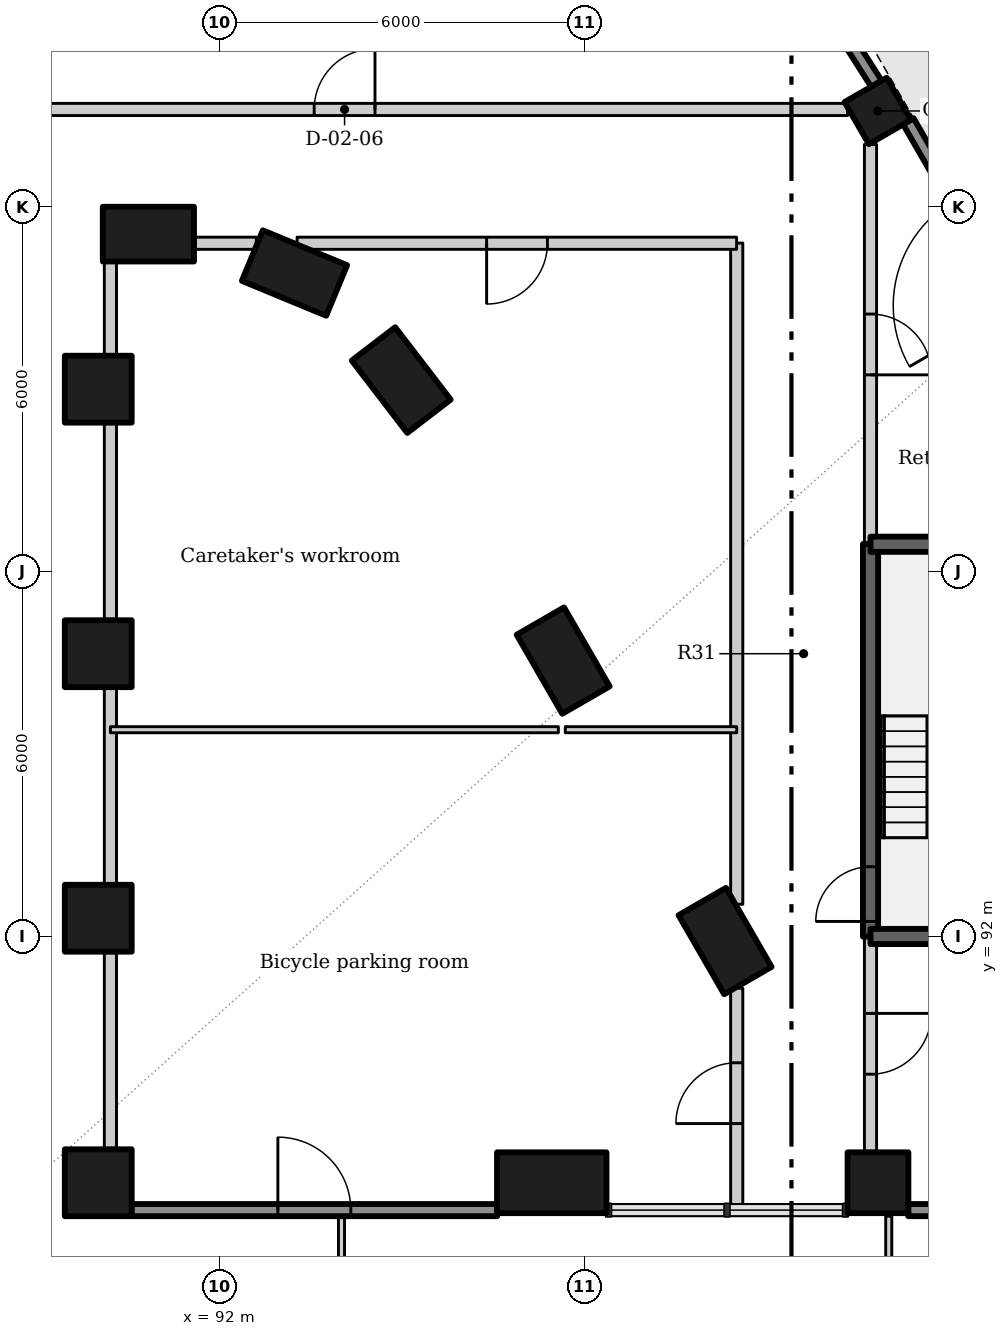
"""IFC4 building model, lengths in metres.
Left out: names, types, materials, properties, quantities, classifications, styles, units other than length and angle.
Written with IfcOpenShell. Run it as: python <this file> out.ifc"""

import sys

from ifc_helpers import new_model, si_unit, direction, frame, frame_2d, origin, origin_2d, place, context, subcontext, project, spatial, rectangle, extrude, element, fill, save


model = new_model("IFC4")
c1 = context("Model", 3, precision=1e-05, world=origin(), true_north=direction((0.0, 1.0)))
c2 = subcontext(c1, "Body", "Model", "MODEL_VIEW")
j1 = project(units=[si_unit("LENGTHUNIT", "METRE"), si_unit("PLANEANGLEUNIT", "RADIAN")], contexts=[c1])
p1 = place(None, origin())
s1 = spatial("IfcSite", under=j1, at=p1, CompositionType="ELEMENT")
p2 = place(p1, origin())
s2 = spatial("IfcBuilding", under=s1, at=p2, CompositionType="ELEMENT")
p3 = place(p2, origin())
s3 = spatial("IfcBuildingStorey", under=s2, at=p3, CompositionType="ELEMENT", Elevation=0.0)
for number, where, z_axis, x_axis in (
    (1, (100.308, 91.925, -1.8), (0.0, 0.0, 1.0), (-0.5, 0.866, 0.0)),
    (2, (97.646, 96.537, -1.8), (0.0, 0.0, 1.0), (-0.5, 0.866, 0.0)),
    (3, (94.982, 101.149, -1.8), (0.0, 0.0, 1.0), (-0.609, 0.793, 0.0)),
    (4, (93.227, 102.91, -1.8), (0.0, 0.0, 1.0), (-0.924, 0.383, 0.0)),
    (5, (90.825, 103.55, -1.8), (0.0, 0.0, 1.0), (-1.0, 0.0, 0.0)),
):
    element("IfcColumn", number, at=place(p3, frame(where, z_axis=z_axis, x_axis=x_axis)), inside=s3, PredefinedType="COLUMN", context=c2, shape_type="SweptSolid", body=[
        extrude(rectangle(XDim=1.5, YDim=0.9, at=origin_2d()), origin(), (0.0, 0.0, 1.0), 8.4),
    ])
for number, where, z_axis, x_axis in (
    (6, (90.0, 87.95, -1.8), (0.0, 0.0, 1.0), (0.0, 1.0, 0.0)),
    (7, (90.0, 92.3, -1.8), (0.0, 0.0, 1.0), (0.0, 1.0, 0.0)),
    (8, (90.0, 96.65, -1.8), (0.0, 0.0, 1.0), (0.0, 1.0, 0.0)),
    (9, (90.0, 101.0, -1.8), (0.0, 0.0, 1.0), (0.0, 1.0, 0.0)),
):
    element("IfcColumn", number, at=place(p3, frame(where, z_axis=z_axis, x_axis=x_axis)), inside=s3, PredefinedType="COLUMN", context=c2, shape_type="SweptSolid", body=[
        extrude(rectangle(XDim=1.1, YDim=1.1, at=origin_2d()), origin(), (0.0, 0.0, 1.0), 8.4),
    ])
p4 = place(p3, frame((102.82, 105.575, -1.8), z_axis=(0.0, 0.0, 1.0), x_axis=(-0.5, 0.866025403784, 0.0)))
e10 = element("IfcColumn", 10, at=p4, inside=s3, PredefinedType="COLUMN", context=c2, shape_type="SweptSolid", body=[
    extrude(rectangle(XDim=0.8, YDim=0.8, at=origin_2d()), origin(), (0.0, 0.0, 1.0), 8.4),
])
p5 = place(p3, frame((97.458, 87.95, -1.8), z_axis=(0.0, 0.0, 1.0), x_axis=(1.0, 0.0, 0.0)))
e11 = element("IfcColumn", 11, at=p5, inside=s3, PredefinedType="COLUMN", context=c2, shape_type="SweptSolid", body=[
    extrude(rectangle(XDim=1.8, YDim=1.0, at=origin_2d()), origin(), (0.0, 0.0, 1.0), 8.4),
])
p6 = place(p3, frame((102.823, 87.95, -1.8), z_axis=(0.0, 0.0, 1.0), x_axis=(1.0, 0.0, 0.0)))
e12 = element("IfcColumn", 12, at=p6, inside=s3, PredefinedType="COLUMN", context=c2, shape_type="SweptSolid", body=[
    extrude(rectangle(XDim=1.0, YDim=1.0, at=origin_2d()), origin(), (0.0, 0.0, 1.0), 8.4),
])
p7 = place(p3, frame((90.546, 87.5, 0.0), z_axis=(0.0, 0.0, 1.0), x_axis=(1.0, 0.0, 0.0)))
e13 = element("IfcWall", 13, at=p7, inside=s3, PredefinedType="SOLIDWALL", context=c2, shape_type="SweptSolid", body=[
    extrude(rectangle(XDim=6.016, YDim=0.2, at=frame_2d((3.008, 0.0))), origin(), (0.0, 0.0, 1.0), 5.4),
])
p8 = place(p7, frame((2.408, 0.0, 0.0)))
e14 = element("IfcOpeningElement", 14, at=p8, cuts=e13, PredefinedType="OPENING", context=c2, shape_type="SweptSolid", body=[
    extrude(rectangle(XDim=1.2, YDim=2.4, at=frame_2d((0.6, 1.2))), frame((0.0, 0.11, 0.0), z_axis=(0.0, -1.0, 0.0), x_axis=(1.0, 0.0, 0.0)), (0.0, 0.0, 1.0), 0.22),
])
p9 = place(p3, frame((103.319, 87.5, 0.0), z_axis=(0.0, 0.0, 1.0), x_axis=(1.0, 0.0, 0.0)))
e15 = element("IfcWall", 15, at=p9, inside=s3, PredefinedType="SOLIDWALL", context=c2, shape_type="SweptSolid", body=[
    extrude(rectangle(XDim=4.094, YDim=0.2, at=frame_2d((2.047, 0.0))), origin(), (0.0, 0.0, 1.0), 5.4),
])
p10 = place(p9, frame((0.847, 0.0, 0.0)))
e16 = element("IfcOpeningElement", 16, at=p10, cuts=e15, PredefinedType="OPENING", context=c2, shape_type="SweptSolid", body=[
    extrude(rectangle(XDim=2.4, YDim=2.7, at=frame_2d((1.2, 1.35))), frame((0.0, 0.11, 0.0), z_axis=(0.0, -1.0, 0.0), x_axis=(1.0, 0.0, 0.0)), (0.0, 0.0, 1.0), 0.22),
])
p11 = place(p3, frame((105.826, 101.068, 0.0), z_axis=(0.0, 0.0, 1.0), x_axis=(-0.499990997566, 0.86603060128, 0.0)))
e17 = element("IfcWall", 17, at=p11, inside=s3, PredefinedType="SOLIDWALL", context=c2, shape_type="SweptSolid", body=[
    extrude(rectangle(XDim=5.01, YDim=0.2, at=frame_2d((2.505, 0.0))), origin(), (0.0, 0.0, 1.0), 5.4),
])
p12 = place(p11, frame((1.505, 0.0, 0.0)))
e18 = element("IfcOpeningElement", 18, at=p12, cuts=e17, PredefinedType="OPENING", context=c2, shape_type="SweptSolid", body=[
    extrude(rectangle(XDim=2.0, YDim=2.4, at=frame_2d((1.0, 1.2))), frame((0.0, 0.11, 0.0), z_axis=(0.0, -1.0, 0.0), x_axis=(1.0, 0.0, 0.0)), (0.0, 0.0, 1.0), 0.22),
])
p13 = place(p3, frame((102.798, 106.022, 0.0), z_axis=(0.0, 0.0, 1.0), x_axis=(-0.537671911107, 0.843154147239, 0.0)))
e19 = element("IfcWall", 19, at=p13, inside=s3, PredefinedType="SOLIDWALL", context=c2, shape_type="SweptSolid", body=[
    extrude(rectangle(XDim=5.057, YDim=0.2, at=frame_2d((2.528, 0.0))), origin(), (0.0, 0.0, 1.0), 5.4),
])
p14 = place(p13, frame((1.928, 0.0, 0.0)))
e20 = element("IfcOpeningElement", 20, at=p14, cuts=e19, PredefinedType="OPENING", context=c2, shape_type="SweptSolid", body=[
    extrude(rectangle(XDim=1.2, YDim=2.4, at=frame_2d((0.6, 1.2))), frame((0.0, 0.11, 0.0), z_axis=(0.0, -1.0, 0.0), x_axis=(1.0, 0.0, 0.0)), (0.0, 0.0, 1.0), 0.22),
])
p15 = place(p3, frame((102.7, 91.997, -1.8), z_axis=(0.0, 0.0, 1.0), x_axis=(0.0, 1.0, 0.0)))
e21 = element("IfcWall", 21, at=p15, inside=s3, PredefinedType="SHEAR", context=c2, shape_type="SweptSolid", body=[
    extrude(rectangle(XDim=6.456, YDim=0.25, at=frame_2d((3.228, 0.0))), origin(), (0.0, 0.0, 1.0), 8.1),
])
p16 = place(p15, frame((0.25, 0.0, 1.8)))
e22 = element("IfcOpeningElement", 22, at=p16, cuts=e21, PredefinedType="OPENING", context=c2, shape_type="SweptSolid", body=[
    extrude(rectangle(XDim=0.9, YDim=2.1, at=frame_2d((0.45, 1.05))), frame((0.0, 0.135, 0.0), z_axis=(0.0, -1.0, 0.0), x_axis=(1.0, 0.0, 0.0)), (0.0, 0.0, 1.0), 0.27),
])
p17 = place(p3, frame((102.7, 92.003, 0.0), z_axis=(0.0, 0.0, 1.0), x_axis=(0.0, -1.0, 0.0)))
e23 = element("IfcWall", 23, at=p17, inside=s3, PredefinedType="PARTITIONING", context=c2, shape_type="SweptSolid", body=[
    extrude(rectangle(XDim=3.536, YDim=0.2, at=frame_2d((1.768, 0.0))), origin(), (0.0, 0.0, 1.0), 6.3),
])
p18 = place(p17, frame((1.268, 0.0, 0.0)))
e24 = element("IfcOpeningElement", 24, at=p18, cuts=e23, PredefinedType="OPENING", context=c2, shape_type="SweptSolid", body=[
    extrude(rectangle(XDim=1.0, YDim=2.1, at=frame_2d((0.5, 1.05))), frame((0.0, 0.11, 0.0), z_axis=(0.0, -1.0, 0.0), x_axis=(1.0, 0.0, 0.0)), (0.0, 0.0, 1.0), 0.22),
])
p19 = place(p3, frame((102.7, 105.025, 0.0), z_axis=(0.0, 0.0, 1.0), x_axis=(0.0, -1.0, 0.0)))
e25 = element("IfcWall", 25, at=p19, inside=s3, PredefinedType="PARTITIONING", context=c2, shape_type="SweptSolid", body=[
    extrude(rectangle(XDim=6.578, YDim=0.2, at=frame_2d((3.289, 0.0))), origin(), (0.0, 0.0, 1.0), 6.3),
])
p20 = place(p19, frame((2.789, 0.0, 0.0)))
e26 = element("IfcOpeningElement", 26, at=p20, cuts=e25, PredefinedType="OPENING", context=c2, shape_type="SweptSolid", body=[
    extrude(rectangle(XDim=1.0, YDim=2.1, at=frame_2d((0.5, 1.05))), frame((0.0, 0.11, 0.0), z_axis=(0.0, -1.0, 0.0), x_axis=(1.0, 0.0, 0.0)), (0.0, 0.0, 1.0), 0.22),
])
p21 = place(p3, frame((81.6, 105.6, 0.0), z_axis=(0.0, 0.0, 1.0), x_axis=(1.0, 0.0, 0.0)))
e27 = element("IfcWall", 27, at=p21, inside=s3, PredefinedType="PARTITIONING", context=c2, shape_type="SweptSolid", body=[
    extrude(rectangle(XDim=20.723, YDim=0.2, at=frame_2d((10.362, 0.0))), origin(), (0.0, 0.0, 1.0), 6.3),
])
p22 = place(p21, frame((11.951, 0.0, 0.0)))
e28 = element("IfcOpeningElement", 28, at=p22, cuts=e27, PredefinedType="OPENING", context=c2, shape_type="SweptSolid", body=[
    extrude(rectangle(XDim=1.0, YDim=2.1, at=frame_2d((0.5, 1.05))), frame((0.0, 0.11, 0.0), z_axis=(0.0, -1.0, 0.0), x_axis=(1.0, 0.0, 0.0)), (0.0, 0.0, 1.0), 0.22),
])
p23 = place(p3, frame((100.5, 87.58, 0.0), z_axis=(0.0, 0.0, 1.0), x_axis=(0.0, 1.0, 0.0)))
e29 = element("IfcWall", 29, at=p23, inside=s3, PredefinedType="PARTITIONING", context=c2, shape_type="SweptSolid", body=[
    extrude(rectangle(XDim=3.569, YDim=0.2, at=frame_2d((1.785, 0.0))), origin(), (0.0, 0.0, 1.0), 5.53),
])
p24 = place(p23, frame((1.343, 0.0, 0.0)))
e30 = element("IfcOpeningElement", 30, at=p24, cuts=e29, PredefinedType="OPENING", context=c2, shape_type="SweptSolid", body=[
    extrude(rectangle(XDim=1.0, YDim=2.1, at=frame_2d((0.5, 1.05))), frame((0.0, 0.11, 0.0), z_axis=(0.0, -1.0, 0.0), x_axis=(1.0, 0.0, 0.0)), (0.0, 0.0, 1.0), 0.22),
])
p25 = place(p3, frame((100.5, 92.53, 0.0), z_axis=(0.0, 0.0, 1.0), x_axis=(0.0, 1.0, 0.0)))
e31 = element("IfcWall", 31, at=p25, inside=s3, PredefinedType="PARTITIONING", context=c2, shape_type="SweptSolid", body=[
    extrude(rectangle(XDim=10.873, YDim=0.2, at=frame_2d((5.437, 0.0))), origin(), (0.0, 0.0, 1.0), 6.3),
])
p26 = place(p3, frame((90.2, 88.517, 0.0), z_axis=(0.0, 0.0, 1.0), x_axis=(0.0, 1.0, 0.0)))
e32 = element("IfcWall", 32, at=p26, inside=s3, PredefinedType="PARTITIONING", context=c2, shape_type="SweptSolid", body=[
    extrude(rectangle(XDim=3.216, YDim=0.2, at=frame_2d((1.608, 0.0))), origin(), (0.0, 0.0, 1.0), 5.53),
])
for number, where, z_axis, x_axis in (
    (33, (90.2, 92.867, 0.0), (0.0, 0.0, 1.0), (0.0, 1.0, 0.0)),
    (34, (90.2, 97.217, 0.0), (0.0, 0.0, 1.0), (0.0, 1.0, 0.0)),
):
    element("IfcWall", number, at=place(p3, frame(where, z_axis=z_axis, x_axis=x_axis)), inside=s3, PredefinedType="PARTITIONING", context=c2, shape_type="SweptSolid", body=[
        extrude(rectangle(XDim=3.216, YDim=0.2, at=frame_2d((1.608, 0.0))), origin(), (0.0, 0.0, 1.0), 5.53),
    ])
p27 = place(p3, frame((90.2, 101.567, 0.0), z_axis=(0.0, 0.0, 1.0), x_axis=(0.0, 1.0, 0.0)))
e35 = element("IfcWall", 35, at=p27, inside=s3, PredefinedType="PARTITIONING", context=c2, shape_type="SweptSolid", body=[
    extrude(rectangle(XDim=1.516, YDim=0.2, at=frame_2d((0.758, 0.0))), origin(), (0.0, 0.0, 1.0), 6.3),
])
p28 = place(p3, frame((91.592, 103.4, 0.0), z_axis=(0.0, 0.0, 1.0), x_axis=(1.0, 0.0, 0.0)))
e36 = element("IfcWall", 36, at=p28, inside=s3, PredefinedType="PARTITIONING", context=c2, shape_type="SweptSolid", body=[
    extrude(rectangle(XDim=1.008, YDim=0.2, at=frame_2d((0.504, 0.0))), origin(), (0.0, 0.0, 1.0), 5.38),
])
p29 = place(p3, frame((100.498, 103.4, 0.0), z_axis=(0.0, 0.0, 1.0), x_axis=(-1.0, 0.0, 0.0)))
e37 = element("IfcWall", 37, at=p29, inside=s3, PredefinedType="PARTITIONING", context=c2, shape_type="SweptSolid", body=[
    extrude(rectangle(XDim=7.228, YDim=0.2, at=frame_2d((3.614, 0.0))), origin(), (0.0, 0.0, 1.0), 6.3),
])
p30 = place(p29, frame((3.111, 0.0, 0.0)))
e38 = element("IfcOpeningElement", 38, at=p30, cuts=e37, PredefinedType="OPENING", context=c2, shape_type="SweptSolid", body=[
    extrude(rectangle(XDim=1.0, YDim=2.1, at=frame_2d((0.5, 1.05))), frame((0.0, 0.11, 0.0), z_axis=(0.0, -1.0, 0.0), x_axis=(1.0, 0.0, 0.0)), (0.0, 0.0, 1.0), 0.22),
])
for number, where, z_axis, x_axis in (
    (39, (102.7, 92.0, -1.8), (0.0, 0.0, 1.0), (1.0, 0.0, 0.0)),
    (40, (102.7, 98.45, -1.8), (0.0, 0.0, 1.0), (1.0, 0.0, 0.0)),
):
    element("IfcWall", number, at=place(p3, frame(where, z_axis=z_axis, x_axis=x_axis)), inside=s3, PredefinedType="SHEAR", context=c2, shape_type="SweptSolid", body=[
        extrude(rectangle(XDim=3.45, YDim=0.25, at=frame_2d((1.725, 0.0))), origin(), (0.0, 0.0, 1.0), 8.1),
    ])
p31 = place(p3, frame((90.2, 95.4, 0.0), z_axis=(0.0, 0.0, 1.0), x_axis=(1.0, 0.0, 0.0)))
e41 = element("IfcWall", 41, at=p31, inside=s3, PredefinedType="PARTITIONING", context=c2, shape_type="SweptSolid", body=[
    extrude(rectangle(XDim=7.366, YDim=0.1, at=frame_2d((3.683, 0.0))), origin(), (0.0, 0.0, 1.0), 6.3),
])
p32 = place(p3, frame((97.68, 95.4, 0.0), z_axis=(0.0, 0.0, 1.0), x_axis=(1.0, 0.0, 0.0)))
e42 = element("IfcWall", 42, at=p32, inside=s3, PredefinedType="PARTITIONING", context=c2, shape_type="SweptSolid", body=[
    extrude(rectangle(XDim=2.82, YDim=0.1, at=frame_2d((1.41, 0.0))), origin(), (0.0, 0.0, 1.0), 5.38),
])
p33 = place(p3, frame((94.0, 87.4, 0.0), z_axis=(0.0, 0.0, 1.0), x_axis=(0.0, -1.0, 0.0)))
e43 = element("IfcWall", 43, at=p33, inside=s3, PredefinedType="PARTITIONING", context=c2, shape_type="SweptSolid", body=[
    extrude(rectangle(XDim=14.8, YDim=0.1, at=frame_2d((7.4, 0.0))), origin(), (0.0, 0.0, 1.0), 6.3),
])
p34 = place(p33, frame((6.65, 0.0, 0.0)))
e44 = element("IfcOpeningElement", 44, at=p34, cuts=e43, PredefinedType="OPENING", context=c2, shape_type="SweptSolid", body=[
    extrude(rectangle(XDim=1.5, YDim=2.1, at=frame_2d((0.75, 1.05))), frame((0.0, 0.06, 0.0), z_axis=(0.0, -1.0, 0.0), x_axis=(1.0, 0.0, 0.0)), (0.0, 0.0, 1.0), 0.12),
])
p35 = place(p3, frame((103.0, 87.4, 0.0), z_axis=(0.0, 0.0, 1.0), x_axis=(0.0, -1.0, 0.0)))
e45 = element("IfcWall", 45, at=p35, inside=s3, PredefinedType="PARTITIONING", context=c2, shape_type="SweptSolid", body=[
    extrude(rectangle(XDim=14.8, YDim=0.1, at=frame_2d((7.4, 0.0))), origin(), (0.0, 0.0, 1.0), 6.3),
])
p36 = place(p35, frame((6.65, 0.0, 0.0)))
e46 = element("IfcOpeningElement", 46, at=p36, cuts=e45, PredefinedType="OPENING", context=c2, shape_type="SweptSolid", body=[
    extrude(rectangle(XDim=1.5, YDim=2.1, at=frame_2d((0.75, 1.05))), frame((0.0, 0.06, 0.0), z_axis=(0.0, -1.0, 0.0), x_axis=(1.0, 0.0, 0.0)), (0.0, 0.0, 1.0), 0.12),
])
p37 = place(p8, origin())
e47 = element("IfcDoor", 47, at=p37, inside=s3, OperationType="SINGLE_SWING_LEFT", PredefinedType="DOOR", context=c2, shape_type="SweptSolid", body=[
    extrude(rectangle(XDim=1.2, YDim=2.4, at=frame_2d((0.6, 1.2))), frame((0.0, 0.025, 0.0), z_axis=(0.0, -1.0, 0.0), x_axis=(1.0, 0.0, 0.0)), (0.0, 0.0, 1.0), 0.05),
])
fill(e14, e47)
p38 = place(p16, origin())
e48 = element("IfcDoor", 48, at=p38, inside=s3, OperationType="SINGLE_SWING_LEFT", PredefinedType="DOOR", context=c2, shape_type="SweptSolid", body=[
    extrude(rectangle(XDim=0.9, YDim=2.1, at=frame_2d((0.45, 1.05))), frame((0.0, 0.025, 0.0), z_axis=(0.0, -1.0, 0.0), x_axis=(1.0, 0.0, 0.0)), (0.0, 0.0, 1.0), 0.05),
])
fill(e22, e48)
p39 = place(p18, origin())
e49 = element("IfcDoor", 49, at=p39, inside=s3, OperationType="SINGLE_SWING_LEFT", PredefinedType="DOOR", context=c2, shape_type="SweptSolid", body=[
    extrude(rectangle(XDim=1.0, YDim=2.1, at=frame_2d((0.5, 1.05))), frame((0.0, 0.025, 0.0), z_axis=(0.0, -1.0, 0.0), x_axis=(1.0, 0.0, 0.0)), (0.0, 0.0, 1.0), 0.05),
])
fill(e24, e49)
p40 = place(p20, origin())
e50 = element("IfcDoor", 50, at=p40, inside=s3, OperationType="SINGLE_SWING_RIGHT", PredefinedType="DOOR", context=c2, shape_type="SweptSolid", body=[
    extrude(rectangle(XDim=1.0, YDim=2.1, at=frame_2d((0.5, 1.05))), frame((0.0, 0.025, 0.0), z_axis=(0.0, -1.0, 0.0), x_axis=(1.0, 0.0, 0.0)), (0.0, 0.0, 1.0), 0.05),
])
fill(e26, e50)
p41 = place(p22, origin())
e51 = element("IfcDoor", 51, at=p41, inside=s3, OperationType="SINGLE_SWING_RIGHT", PredefinedType="DOOR", context=c2, shape_type="SweptSolid", body=[
    extrude(rectangle(XDim=1.0, YDim=2.1, at=frame_2d((0.5, 1.05))), frame((0.0, 0.025, 0.0), z_axis=(0.0, -1.0, 0.0), x_axis=(1.0, 0.0, 0.0)), (0.0, 0.0, 1.0), 0.05),
])
fill(e28, e51)
p42 = place(p24, origin())
e52 = element("IfcDoor", 52, at=p42, inside=s3, OperationType="SINGLE_SWING_LEFT", PredefinedType="DOOR", context=c2, shape_type="SweptSolid", body=[
    extrude(rectangle(XDim=1.0, YDim=2.1, at=frame_2d((0.5, 1.05))), frame((0.0, 0.025, 0.0), z_axis=(0.0, -1.0, 0.0), x_axis=(1.0, 0.0, 0.0)), (0.0, 0.0, 1.0), 0.05),
])
fill(e30, e52)
p43 = place(p30, origin())
e53 = element("IfcDoor", 53, at=p43, inside=s3, OperationType="SINGLE_SWING_RIGHT", PredefinedType="DOOR", context=c2, shape_type="SweptSolid", body=[
    extrude(rectangle(XDim=1.0, YDim=2.1, at=frame_2d((0.5, 1.05))), frame((0.0, 0.025, 0.0), z_axis=(0.0, -1.0, 0.0), x_axis=(1.0, 0.0, 0.0)), (0.0, 0.0, 1.0), 0.05),
])
fill(e38, e53)
save(model, sys.argv[1])
